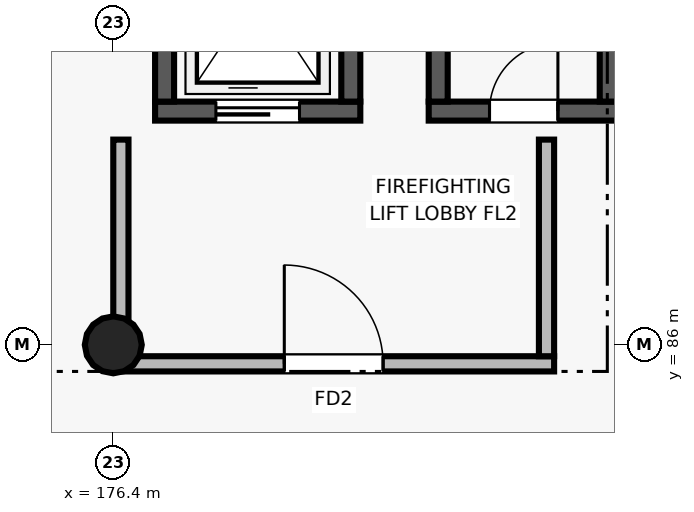
"""IFC4 building model, lengths in metres.
Left out: names, types, materials, properties, quantities, classifications, styles, units other than length and angle.
Written with IfcOpenShell. Run it as: python <this file> out.ifc"""

import sys

from ifc_helpers import new_model, si_unit, direction, frame, frame_2d, origin, origin_2d, place, context, subcontext, project, spatial, rectangle, circle, extrude, element, fill, save


model = new_model("IFC4")
c1 = context("Model", 3, precision=1e-05, world=origin(), true_north=direction((0.0, 1.0)))
c2 = subcontext(c1, "Body", "Model", "MODEL_VIEW")
j1 = project(units=[si_unit("LENGTHUNIT", "METRE"), si_unit("PLANEANGLEUNIT", "RADIAN")], contexts=[c1])
p1 = place(None, origin())
s1 = spatial("IfcSite", under=j1, at=p1, CompositionType="ELEMENT")
p2 = place(p1, origin())
s2 = spatial("IfcBuilding", under=s1, at=p2, CompositionType="ELEMENT")
p3 = place(p2, origin())
s3 = spatial("IfcBuildingStorey", under=s2, at=p3, CompositionType="ELEMENT", Elevation=0.0)
p4 = place(p3, frame((176.4, 86.0, 0.0), z_axis=(0.0, 0.0, 1.0), x_axis=(1.0, 0.0, 0.0)))
e1 = element("IfcColumn", 1, at=p4, inside=s3, PredefinedType="COLUMN", context=c2, shape_type="SweptSolid", body=[
    extrude(circle(Radius=0.375, at=origin_2d()), origin(), (0.0, 0.0, 1.0), 4.5),
])
p5 = place(p3, frame((176.95, 89.075, 0.0), z_axis=(0.0, 0.0, 1.0), x_axis=(1.0, 0.0, 0.0)))
e2 = element("IfcWall", 2, at=p5, inside=s3, PredefinedType="SHEAR", context=c2, shape_type="SweptSolid", body=[
    extrude(rectangle(XDim=2.7, YDim=0.25, at=frame_2d((1.35, 0.0))), origin(), (0.0, 0.0, 1.0), 4.22),
])
p6 = place(p5, frame((0.8, 0.0, 0.0)))
e3 = element("IfcOpeningElement", 3, at=p6, cuts=e2, PredefinedType="OPENING", context=c2, shape_type="SweptSolid", body=[
    extrude(rectangle(XDim=1.1, YDim=2.15, at=frame_2d((0.55, 1.075))), frame((0.0, 0.135, 0.0), z_axis=(0.0, -1.0, 0.0), x_axis=(1.0, 0.0, 0.0)), (0.0, 0.0, 1.0), 0.27),
])
for number, where, z_axis, x_axis in (
    (4, (177.075, 89.2, 0.0), (0.0, 0.0, 1.0), (0.0, 1.0, 0.0)),
    (5, (179.525, 89.2, 0.0), (0.0, 0.0, 1.0), (0.0, 1.0, 0.0)),
):
    element("IfcWall", number, at=place(p3, frame(where, z_axis=z_axis, x_axis=x_axis)), inside=s3, PredefinedType="SHEAR", context=c2, shape_type="SweptSolid", body=[
        extrude(rectangle(XDim=2.9, YDim=0.25, at=frame_2d((1.45, 0.0))), origin(), (0.0, 0.0, 1.0), 4.22),
    ])
p7 = place(p3, frame((176.4, 85.75, 0.0), z_axis=(0.0, 0.0, 1.0), x_axis=(1.0, 0.0, 0.0)))
e6 = element("IfcWall", 6, at=p7, inside=s3, PredefinedType="SOLIDWALL", context=c2, shape_type="SweptSolid", body=[
    extrude(rectangle(XDim=5.8, YDim=0.2, at=frame_2d((2.9, 0.0))), origin(), (0.0, 0.0, 1.0), 3.62),
])
p8 = place(p7, frame((2.25, 0.0, 0.0)))
e7 = element("IfcOpeningElement", 7, at=p8, cuts=e6, PredefinedType="OPENING", context=c2, shape_type="SweptSolid", body=[
    extrude(rectangle(XDim=1.3, YDim=2.2, at=frame_2d((0.65, 1.1))), frame((0.0, 0.11, 0.0), z_axis=(0.0, -1.0, 0.0), x_axis=(1.0, 0.0, 0.0)), (0.0, 0.0, 1.0), 0.22),
])
p9 = place(p3, frame((176.5, 85.85, 0.0), z_axis=(0.0, 0.0, 1.0), x_axis=(0.0, 1.0, 0.0)))
e8 = element("IfcWall", 8, at=p9, inside=s3, PredefinedType="SOLIDWALL", context=c2, shape_type="SweptSolid", body=[
    extrude(rectangle(XDim=2.85, YDim=0.2, at=frame_2d((1.425, 0.0))), origin(), (0.0, 0.0, 1.0), 3.7),
])
p10 = place(p3, frame((182.1, 85.85, 0.0), z_axis=(0.0, 0.0, 1.0), x_axis=(0.0, 1.0, 0.0)))
e9 = element("IfcWall", 9, at=p10, inside=s3, PredefinedType="SOLIDWALL", context=c2, shape_type="SweptSolid", body=[
    extrude(rectangle(XDim=2.85, YDim=0.2, at=frame_2d((1.425, 0.0))), origin(), (0.0, 0.0, 1.0), 4.22),
])
p11 = place(p3, frame((180.55, 89.075, 0.0), z_axis=(0.0, 0.0, 1.0), x_axis=(1.0, 0.0, 0.0)))
e10 = element("IfcWall", 10, at=p11, inside=s3, PredefinedType="SHEAR", context=c2, shape_type="SweptSolid", body=[
    extrude(rectangle(XDim=2.5, YDim=0.25, at=frame_2d((1.25, 0.0))), origin(), (0.0, 0.0, 1.0), 4.22),
])
p12 = place(p11, frame((0.8, 0.0, 0.0)))
e11 = element("IfcOpeningElement", 11, at=p12, cuts=e10, PredefinedType="OPENING", context=c2, shape_type="SweptSolid", body=[
    extrude(rectangle(XDim=0.9, YDim=2.05, at=frame_2d((0.45, 1.025))), frame((0.0, 0.135, 0.0), z_axis=(0.0, -1.0, 0.0), x_axis=(1.0, 0.0, 0.0)), (0.0, 0.0, 1.0), 0.27),
])
for number, where, z_axis, x_axis in (
    (12, (180.675, 89.2, 0.0), (0.0, 0.0, 1.0), (0.0, 1.0, 0.0)),
    (13, (182.925, 89.2, 0.0), (0.0, 0.0, 1.0), (0.0, 1.0, 0.0)),
):
    element("IfcWall", number, at=place(p3, frame(where, z_axis=z_axis, x_axis=x_axis)), inside=s3, PredefinedType="SHEAR", context=c2, shape_type="SweptSolid", body=[
        extrude(rectangle(XDim=2.9, YDim=0.25, at=frame_2d((1.45, 0.0))), origin(), (0.0, 0.0, 1.0), 4.22),
    ])
p13 = place(p8, origin())
e14 = element("IfcDoor", 14, at=p13, inside=s3, OperationType="SINGLE_SWING_LEFT", PredefinedType="DOOR", context=c2, shape_type="SweptSolid", body=[
    extrude(rectangle(XDim=1.3, YDim=2.2, at=frame_2d((0.65, 1.1))), frame((0.0, 0.025, 0.0), z_axis=(0.0, -1.0, 0.0), x_axis=(1.0, 0.0, 0.0)), (0.0, 0.0, 1.0), 0.05),
])
fill(e7, e14)
p14 = place(p12, origin())
e15 = element("IfcDoor", 15, at=p14, inside=s3, OperationType="SINGLE_SWING_RIGHT", PredefinedType="DOOR", context=c2, shape_type="SweptSolid", body=[
    extrude(rectangle(XDim=0.9, YDim=2.05, at=frame_2d((0.45, 1.025))), frame((0.0, 0.025, 0.0), z_axis=(0.0, -1.0, 0.0), x_axis=(1.0, 0.0, 0.0)), (0.0, 0.0, 1.0), 0.05),
])
fill(e11, e15)
p15 = place(p6, origin())
e16 = element("IfcDoor", 16, at=p15, inside=s3, OperationType="SLIDING_TO_LEFT", PredefinedType="DOOR", context=c2, shape_type="SweptSolid", body=[
    extrude(rectangle(XDim=1.1, YDim=2.15, at=frame_2d((0.55, 1.075))), frame((0.0, 0.025, 0.0), z_axis=(0.0, -1.0, 0.0), x_axis=(1.0, 0.0, 0.0)), (0.0, 0.0, 1.0), 0.05),
])
fill(e3, e16)
save(model, sys.argv[1])
